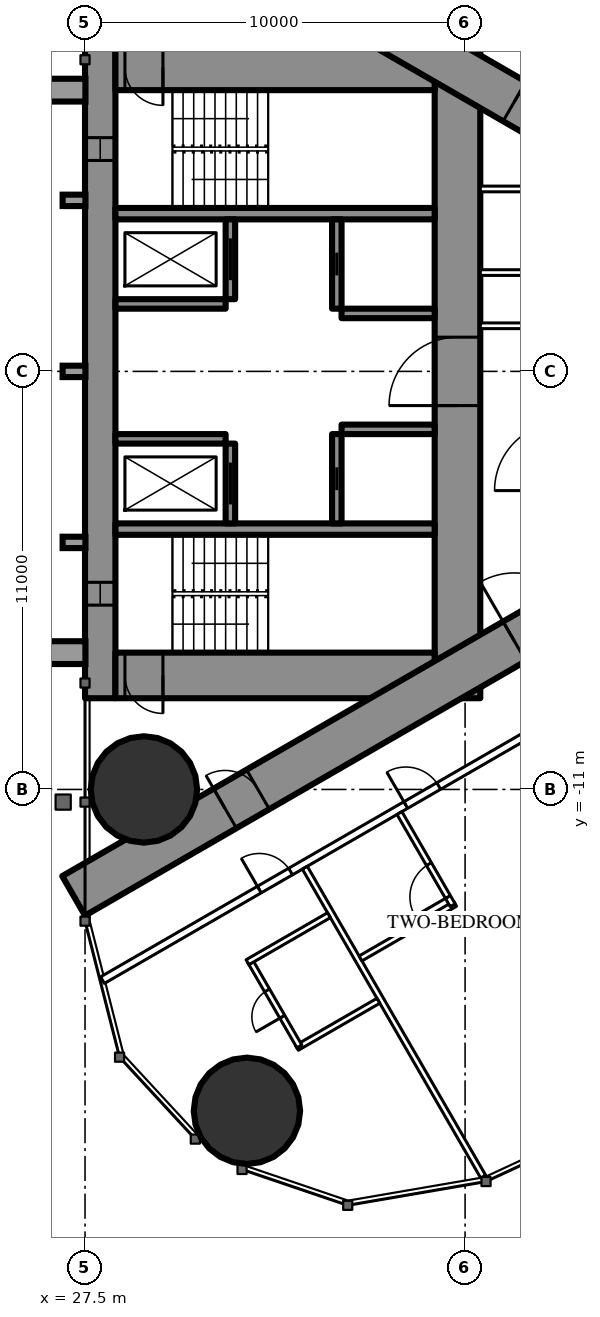
"""IFC4 building model, lengths in metres.
Left out: names, types, materials, properties, quantities, classifications, styles, units other than length and angle.
Written with IfcOpenShell. Run it as: python <this file> out.ifc"""

import sys

from ifc_helpers import new_model, si_unit, direction, frame, frame_2d, origin, origin_2d, place, context, subcontext, project, spatial, rectangle, circle, extrude, element, fill, save


model = new_model("IFC4")
c1 = context("Model", 3, precision=1e-05, world=origin(), true_north=direction((0.0, 1.0)))
c2 = subcontext(c1, "Body", "Model", "MODEL_VIEW")
j1 = project(units=[si_unit("LENGTHUNIT", "METRE"), si_unit("PLANEANGLEUNIT", "RADIAN")], contexts=[c1])
p1 = place(None, origin())
s1 = spatial("IfcSite", under=j1, at=p1, CompositionType="ELEMENT")
p2 = place(p1, origin())
s2 = spatial("IfcBuilding", under=s1, at=p2, CompositionType="ELEMENT")
p3 = place(p2, frame((0.0, 0.0, 173.8)))
s3 = spatial("IfcBuildingStorey", under=s2, at=p3, CompositionType="ELEMENT", Elevation=173.8)
for number, where, z_axis, x_axis in (
    (1, (31.76, -19.456, 0.0), (0.0, 0.0, 1.0), (1.0, 0.0, 0.0)),
    (2, (29.05, -11.0, 0.0), (0.0, 0.0, 1.0), (1.0, 0.0, 0.0)),
):
    element("IfcColumn", number, at=place(p3, frame(where, z_axis=z_axis, x_axis=x_axis)), inside=s3, PredefinedType="COLUMN", context=c2, shape_type="SweptSolid", body=[
        extrude(circle(Radius=1.4, at=origin_2d()), origin(), (0.0, 0.0, 1.0), 3.5),
    ])
p4 = place(p3, frame((27.9, -8.6, 0.0), z_axis=(0.0, 0.0, 1.0), x_axis=(0.0, 1.0, 0.0)))
e3 = element("IfcWall", 3, at=p4, inside=s3, PredefinedType="SHEAR", context=c2, shape_type="SweptSolid", body=[
    extrude(rectangle(XDim=17.2, YDim=0.8, at=frame_2d((8.6, 0.0))), origin(), (0.0, 0.0, 1.0), 3.5),
])
p5 = place(p4, frame((2.45, 0.0, 0.6)))
e4 = element("IfcOpeningElement", 4, at=p5, cuts=e3, PredefinedType="OPENING", context=c2, shape_type="SweptSolid", body=[
    extrude(rectangle(XDim=0.6, YDim=2.1, at=frame_2d((0.3, 1.05))), frame((0.0, 0.41, 0.0), z_axis=(0.0, -1.0, 0.0), x_axis=(1.0, 0.0, 0.0)), (0.0, 0.0, 1.0), 0.82),
])
p6 = place(p4, frame((14.15, 0.0, 0.6)))
e5 = element("IfcOpeningElement", 5, at=p6, cuts=e3, PredefinedType="OPENING", context=c2, shape_type="SweptSolid", body=[
    extrude(rectangle(XDim=0.6, YDim=2.1, at=frame_2d((0.3, 1.05))), frame((0.0, 0.41, 0.0), z_axis=(0.0, -1.0, 0.0), x_axis=(1.0, 0.0, 0.0)), (0.0, 0.0, 1.0), 0.82),
])
p7 = place(p3, frame((37.3, -8.6, 0.0), z_axis=(0.0, 0.0, 1.0), x_axis=(0.0, 1.0, 0.0)))
e6 = element("IfcWall", 6, at=p7, inside=s3, PredefinedType="SHEAR", context=c2, shape_type="SweptSolid", body=[
    extrude(rectangle(XDim=17.2, YDim=1.2, at=frame_2d((8.6, 0.0))), origin(), (0.0, 0.0, 1.0), 3.5),
])
p8 = place(p7, frame((7.7, 0.0, 0.0)))
e7 = element("IfcOpeningElement", 7, at=p8, cuts=e6, PredefinedType="OPENING", context=c2, shape_type="SweptSolid", body=[
    extrude(rectangle(XDim=1.8, YDim=2.2, at=frame_2d((0.9, 1.1))), frame((0.0, 0.61, 0.0), z_axis=(0.0, -1.0, 0.0), x_axis=(1.0, 0.0, 0.0)), (0.0, 0.0, 1.0), 1.22),
])
p9 = place(p3, frame((28.3, -8.0, 0.0), z_axis=(0.0, 0.0, 1.0), x_axis=(1.0, 0.0, 0.0)))
e8 = element("IfcWall", 8, at=p9, inside=s3, PredefinedType="SHEAR", context=c2, shape_type="SweptSolid", body=[
    extrude(rectangle(XDim=8.4, YDim=1.2, at=frame_2d((4.2, 0.0))), origin(), (0.0, 0.0, 1.0), 3.5),
])
p10 = place(p9, frame((0.25, 0.0, 0.0)))
e9 = element("IfcOpeningElement", 9, at=p10, cuts=e8, PredefinedType="OPENING", context=c2, shape_type="SweptSolid", body=[
    extrude(rectangle(XDim=1.0, YDim=2.2, at=frame_2d((0.5, 1.1))), frame((0.0, 0.61, 0.0), z_axis=(0.0, -1.0, 0.0), x_axis=(1.0, 0.0, 0.0)), (0.0, 0.0, 1.0), 1.22),
])
p11 = place(p3, frame((28.3, 8.0, 0.0), z_axis=(0.0, 0.0, 1.0), x_axis=(1.0, 0.0, 0.0)))
e10 = element("IfcWall", 10, at=p11, inside=s3, PredefinedType="SHEAR", context=c2, shape_type="SweptSolid", body=[
    extrude(rectangle(XDim=8.4, YDim=1.2, at=frame_2d((4.2, 0.0))), origin(), (0.0, 0.0, 1.0), 3.5),
])
p12 = place(p11, frame((0.25, 0.0, 0.0)))
e11 = element("IfcOpeningElement", 11, at=p12, cuts=e10, PredefinedType="OPENING", context=c2, shape_type="SweptSolid", body=[
    extrude(rectangle(XDim=1.0, YDim=2.2, at=frame_2d((0.5, 1.1))), frame((0.0, 0.61, 0.0), z_axis=(0.0, -1.0, 0.0), x_axis=(1.0, 0.0, 0.0)), (0.0, 0.0, 1.0), 1.22),
])
for number, where, z_axis, x_axis in (
    (12, (28.3, -4.15, 0.0), (0.0, 0.0, 1.0), (1.0, 0.0, 0.0)),
    (13, (28.3, 4.15, 0.0), (0.0, 0.0, 1.0), (1.0, 0.0, 0.0)),
):
    element("IfcWall", number, at=place(p3, frame(where, z_axis=z_axis, x_axis=x_axis)), inside=s3, PredefinedType="SHEAR", context=c2, shape_type="SweptSolid", body=[
        extrude(rectangle(XDim=8.4, YDim=0.3, at=frame_2d((4.2, 0.0))), origin(), (0.0, 0.0, 1.0), 3.5),
    ])
p13 = place(p3, frame((31.325, -4.0, 0.0), z_axis=(0.0, 0.0, 1.0), x_axis=(0.0, 1.0, 0.0)))
e14 = element("IfcWall", 14, at=p13, inside=s3, PredefinedType="SHEAR", context=c2, shape_type="SweptSolid", body=[
    extrude(rectangle(XDim=2.1, YDim=0.25, at=frame_2d((1.05, 0.0))), origin(), (0.0, 0.0, 1.0), 3.5),
])
p14 = place(p13, frame((0.5, 0.0, 0.0)))
e15 = element("IfcOpeningElement", 15, at=p14, cuts=e14, PredefinedType="OPENING", context=c2, shape_type="SweptSolid", body=[
    extrude(rectangle(XDim=1.1, YDim=2.2, at=frame_2d((0.55, 1.1))), frame((0.0, 0.135, 0.0), z_axis=(0.0, -1.0, 0.0), x_axis=(1.0, 0.0, 0.0)), (0.0, 0.0, 1.0), 0.27),
])
p15 = place(p3, frame((34.125, -4.0, 0.0), z_axis=(0.0, 0.0, 1.0), x_axis=(0.0, 1.0, 0.0)))
e16 = element("IfcWall", 16, at=p15, inside=s3, PredefinedType="SHEAR", context=c2, shape_type="SweptSolid", body=[
    extrude(rectangle(XDim=2.35, YDim=0.25, at=frame_2d((1.175, 0.0))), origin(), (0.0, 0.0, 1.0), 3.5),
])
p16 = place(p15, frame((0.875, 0.0, 0.0)))
e17 = element("IfcOpeningElement", 17, at=p16, cuts=e16, PredefinedType="OPENING", context=c2, shape_type="SweptSolid", body=[
    extrude(rectangle(XDim=0.6, YDim=2.0, at=frame_2d((0.3, 1.0))), frame((0.0, 0.135, 0.0), z_axis=(0.0, -1.0, 0.0), x_axis=(1.0, 0.0, 0.0)), (0.0, 0.0, 1.0), 0.27),
])
p17 = place(p3, frame((28.3, -1.775, 0.0), z_axis=(0.0, 0.0, 1.0), x_axis=(1.0, 0.0, 0.0)))
e18 = element("IfcWall", 18, at=p17, inside=s3, PredefinedType="SHEAR", context=c2, shape_type="SweptSolid", body=[
    extrude(rectangle(XDim=2.9, YDim=0.25, at=frame_2d((1.45, 0.0))), origin(), (0.0, 0.0, 1.0), 3.5),
])
p18 = place(p3, frame((34.25, -1.525, 0.0), z_axis=(0.0, 0.0, 1.0), x_axis=(1.0, 0.0, 0.0)))
e19 = element("IfcWall", 19, at=p18, inside=s3, PredefinedType="SHEAR", context=c2, shape_type="SweptSolid", body=[
    extrude(rectangle(XDim=2.45, YDim=0.25, at=frame_2d((1.225, 0.0))), origin(), (0.0, 0.0, 1.0), 3.5),
])
p19 = place(p3, frame((31.325, 1.9, 0.0), z_axis=(0.0, 0.0, 1.0), x_axis=(0.0, 1.0, 0.0)))
e20 = element("IfcWall", 20, at=p19, inside=s3, PredefinedType="SHEAR", context=c2, shape_type="SweptSolid", body=[
    extrude(rectangle(XDim=2.1, YDim=0.25, at=frame_2d((1.05, 0.0))), origin(), (0.0, 0.0, 1.0), 3.5),
])
p20 = place(p19, frame((0.5, 0.0, 0.0)))
e21 = element("IfcOpeningElement", 21, at=p20, cuts=e20, PredefinedType="OPENING", context=c2, shape_type="SweptSolid", body=[
    extrude(rectangle(XDim=1.1, YDim=2.2, at=frame_2d((0.55, 1.1))), frame((0.0, 0.135, 0.0), z_axis=(0.0, -1.0, 0.0), x_axis=(1.0, 0.0, 0.0)), (0.0, 0.0, 1.0), 0.27),
])
p21 = place(p3, frame((34.125, 1.65, 0.0), z_axis=(0.0, 0.0, 1.0), x_axis=(0.0, 1.0, 0.0)))
e22 = element("IfcWall", 22, at=p21, inside=s3, PredefinedType="SHEAR", context=c2, shape_type="SweptSolid", body=[
    extrude(rectangle(XDim=2.35, YDim=0.25, at=frame_2d((1.175, 0.0))), origin(), (0.0, 0.0, 1.0), 3.5),
])
p22 = place(p21, frame((0.875, 0.0, 0.0)))
e23 = element("IfcOpeningElement", 23, at=p22, cuts=e22, PredefinedType="OPENING", context=c2, shape_type="SweptSolid", body=[
    extrude(rectangle(XDim=0.6, YDim=2.0, at=frame_2d((0.3, 1.0))), frame((0.0, 0.135, 0.0), z_axis=(0.0, -1.0, 0.0), x_axis=(1.0, 0.0, 0.0)), (0.0, 0.0, 1.0), 0.27),
])
p23 = place(p3, frame((28.3, 1.775, 0.0), z_axis=(0.0, 0.0, 1.0), x_axis=(1.0, 0.0, 0.0)))
e24 = element("IfcWall", 24, at=p23, inside=s3, PredefinedType="SHEAR", context=c2, shape_type="SweptSolid", body=[
    extrude(rectangle(XDim=2.9, YDim=0.25, at=frame_2d((1.45, 0.0))), origin(), (0.0, 0.0, 1.0), 3.5),
])
p24 = place(p3, frame((34.25, 1.525, 0.0), z_axis=(0.0, 0.0, 1.0), x_axis=(1.0, 0.0, 0.0)))
e25 = element("IfcWall", 25, at=p24, inside=s3, PredefinedType="SHEAR", context=c2, shape_type="SweptSolid", body=[
    extrude(rectangle(XDim=2.45, YDim=0.25, at=frame_2d((1.225, 0.0))), origin(), (0.0, 0.0, 1.0), 3.5),
])
p25 = place(p3, frame((27.2, -13.8, 0.0), z_axis=(0.0, 0.0, 1.0), x_axis=(0.866027159892, 0.499996958321, 0.0)))
e26 = element("IfcWall", 26, at=p25, inside=s3, PredefinedType="SHEAR", context=c2, shape_type="SweptSolid", body=[
    extrude(rectangle(XDim=27.947, YDim=1.2, at=frame_2d((13.973, 0.0))), origin(), (0.0, 0.0, 1.0), 3.5),
])
p26 = place(p25, frame((4.6, 0.0, 0.0)))
e27 = element("IfcOpeningElement", 27, at=p26, cuts=e26, PredefinedType="OPENING", context=c2, shape_type="SweptSolid", body=[
    extrude(rectangle(XDim=1.0, YDim=2.2, at=frame_2d((0.5, 1.1))), frame((0.0, 0.61, 0.0), z_axis=(0.0, -1.0, 0.0), x_axis=(1.0, 0.0, 0.0)), (0.0, 0.0, 1.0), 1.22),
])
p27 = place(p25, frame((13.395, 0.0, 0.0)))
e28 = element("IfcOpeningElement", 28, at=p27, cuts=e26, PredefinedType="OPENING", context=c2, shape_type="SweptSolid", body=[
    extrude(rectangle(XDim=1.8, YDim=2.2, at=frame_2d((0.9, 1.1))), frame((0.0, 0.61, 0.0), z_axis=(0.0, -1.0, 0.0), x_axis=(1.0, 0.0, 0.0)), (0.0, 0.0, 1.0), 1.22),
])
p28 = place(p3, frame((27.2, 13.8, 0.0), z_axis=(0.0, 0.0, 1.0), x_axis=(0.866024515034, -0.500001539357, 0.0)))
e29 = element("IfcWall", 29, at=p28, inside=s3, PredefinedType="SHEAR", context=c2, shape_type="SweptSolid", body=[
    extrude(rectangle(XDim=26.907, YDim=1.2, at=frame_2d((13.454, 0.0))), origin(), (0.0, 0.0, 1.0), 3.5),
])
p29 = place(p28, frame((4.6, 0.0, 0.0)))
e30 = element("IfcOpeningElement", 30, at=p29, cuts=e29, PredefinedType="OPENING", context=c2, shape_type="SweptSolid", body=[
    extrude(rectangle(XDim=1.0, YDim=2.2, at=frame_2d((0.5, 1.1))), frame((0.0, 0.61, 0.0), z_axis=(0.0, -1.0, 0.0), x_axis=(1.0, 0.0, 0.0)), (0.0, 0.0, 1.0), 1.22),
])
p30 = place(p28, frame((13.395, 0.0, 0.0)))
e31 = element("IfcOpeningElement", 31, at=p30, cuts=e29, PredefinedType="OPENING", context=c2, shape_type="SweptSolid", body=[
    extrude(rectangle(XDim=1.8, YDim=2.2, at=frame_2d((0.9, 1.1))), frame((0.0, 0.61, 0.0), z_axis=(0.0, -1.0, 0.0), x_axis=(1.0, 0.0, 0.0)), (0.0, 0.0, 1.0), 1.22),
])
p31 = place(p3, frame((27.959, -16.017, 0.0), z_axis=(0.0, 0.0, 1.0), x_axis=(0.866024151371, 0.500002169237, 0.0)))
e32 = element("IfcWall", 32, at=p31, inside=s3, PredefinedType="PARTITIONING", context=c2, shape_type="SweptSolid", body=[
    extrude(rectangle(XDim=32.034, YDim=0.2, at=frame_2d((16.017, 0.0))), origin(), (0.0, 0.0, 1.0), 3.25),
])
p32 = place(p31, frame((4.765, 0.0, 0.0)))
e33 = element("IfcOpeningElement", 33, at=p32, cuts=e32, PredefinedType="OPENING", context=c2, shape_type="SweptSolid", body=[
    extrude(rectangle(XDim=0.95, YDim=2.2, at=frame_2d((0.475, 1.1))), frame((0.0, 0.11, 0.0), z_axis=(0.0, -1.0, 0.0), x_axis=(1.0, 0.0, 0.0)), (0.0, 0.0, 1.0), 0.22),
])
p33 = place(p31, frame((9.215, 0.0, 0.0)))
e34 = element("IfcOpeningElement", 34, at=p33, cuts=e32, PredefinedType="OPENING", context=c2, shape_type="SweptSolid", body=[
    extrude(rectangle(XDim=1.0, YDim=2.2, at=frame_2d((0.5, 1.1))), frame((0.0, 0.11, 0.0), z_axis=(0.0, -1.0, 0.0), x_axis=(1.0, 0.0, 0.0)), (0.0, 0.0, 1.0), 0.22),
])
p34 = place(p31, frame((19.725, 0.0, 0.0)))
e35 = element("IfcOpeningElement", 35, at=p34, cuts=e32, PredefinedType="OPENING", context=c2, shape_type="SweptSolid", body=[
    extrude(rectangle(XDim=0.95, YDim=2.2, at=frame_2d((0.475, 1.1))), frame((0.0, 0.11, 0.0), z_axis=(0.0, -1.0, 0.0), x_axis=(1.0, 0.0, 0.0)), (0.0, 0.0, 1.0), 0.22),
])
p35 = place(p31, frame((26.125, 0.0, 0.0)))
e36 = element("IfcOpeningElement", 36, at=p35, cuts=e32, PredefinedType="OPENING", context=c2, shape_type="SweptSolid", body=[
    extrude(rectangle(XDim=0.95, YDim=2.2, at=frame_2d((0.475, 1.1))), frame((0.0, 0.11, 0.0), z_axis=(0.0, -1.0, 0.0), x_axis=(1.0, 0.0, 0.0)), (0.0, 0.0, 1.0), 0.22),
])
p36 = place(p31, frame((28.106, 0.0, 0.0)))
e37 = element("IfcOpeningElement", 37, at=p36, cuts=e32, PredefinedType="OPENING", context=c2, shape_type="SweptSolid", body=[
    extrude(rectangle(XDim=0.95, YDim=2.2, at=frame_2d((0.475, 1.1))), frame((0.0, 0.11, 0.0), z_axis=(0.0, -1.0, 0.0), x_axis=(1.0, 0.0, 0.0)), (0.0, 0.0, 1.0), 0.22),
])
p37 = place(p3, frame((33.284, -13.059, 0.0), z_axis=(0.0, 0.0, 1.0), x_axis=(0.499985904184, -0.866033541855, 0.0)))
e38 = element("IfcWall", 38, at=p37, inside=s3, PredefinedType="PARTITIONING", context=c2, shape_type="SweptSolid", body=[
    extrude(rectangle(XDim=9.385, YDim=0.15, at=frame_2d((4.693, 0.0))), origin(), (0.0, 0.0, 1.0), 3.25),
])
p38 = place(p3, frame((33.075, -17.798, 0.0), z_axis=(0.0, 0.0, 1.0), x_axis=(0.866006523861, 0.500032699561, 0.0)))
e39 = element("IfcWall", 39, at=p38, inside=s3, PredefinedType="PARTITIONING", context=c2, shape_type="SweptSolid", body=[
    extrude(rectangle(XDim=2.475, YDim=0.15, at=frame_2d((1.237, 0.0))), origin(), (0.0, 0.0, 1.0), 3.25),
])
p39 = place(p3, frame((31.84, -15.509, 0.0), z_axis=(0.0, 0.0, 1.0), x_axis=(0.500006934395, -0.866021400173, 0.0)))
e40 = element("IfcWall", 40, at=p39, inside=s3, PredefinedType="PARTITIONING", context=c2, shape_type="SweptSolid", body=[
    extrude(rectangle(XDim=2.6, YDim=0.15, at=frame_2d((1.3, 0.0))), origin(), (0.0, 0.0, 1.0), 3.25),
])
p40 = place(p39, frame((0.9, 0.0, 0.0)))
e41 = element("IfcOpeningElement", 41, at=p40, cuts=e40, PredefinedType="OPENING", context=c2, shape_type="SweptSolid", body=[
    extrude(rectangle(XDim=0.8, YDim=2.2, at=frame_2d((0.4, 1.1))), frame((0.0, 0.085, 0.0), z_axis=(0.0, -1.0, 0.0), x_axis=(1.0, 0.0, 0.0)), (0.0, 0.0, 1.0), 0.17),
])
p41 = place(p3, frame((31.775, -15.546, 0.0), z_axis=(0.0, 0.0, 1.0), x_axis=(0.866031185235, 0.4999899861, 0.0)))
e42 = element("IfcWall", 42, at=p41, inside=s3, PredefinedType="PARTITIONING", context=c2, shape_type="SweptSolid", body=[
    extrude(rectangle(XDim=2.475, YDim=0.15, at=frame_2d((1.238, 0.0))), origin(), (0.0, 0.0, 1.0), 3.25),
])
p42 = place(p3, frame((34.749, -15.446, 0.0), z_axis=(0.0, 0.0, 1.0), x_axis=(0.866018712932, 0.500011588718, 0.0)))
e43 = element("IfcWall", 43, at=p42, inside=s3, PredefinedType="PARTITIONING", context=c2, shape_type="SweptSolid", body=[
    extrude(rectangle(XDim=2.875, YDim=0.15, at=frame_2d((1.438, 0.0))), origin(), (0.0, 0.0, 1.0), 3.25),
])
p43 = place(p3, frame((35.773, -11.621, 0.0), z_axis=(0.0, 0.0, 1.0), x_axis=(0.49998411664, -0.866034573852, 0.0)))
e44 = element("IfcWall", 44, at=p43, inside=s3, PredefinedType="PARTITIONING", context=c2, shape_type="SweptSolid", body=[
    extrude(rectangle(XDim=2.8, YDim=0.15, at=frame_2d((1.4, 0.0))), origin(), (0.0, 0.0, 1.0), 3.25),
])
p44 = place(p43, frame((1.55, 0.0, 0.0)))
e45 = element("IfcOpeningElement", 45, at=p44, cuts=e44, PredefinedType="OPENING", context=c2, shape_type="SweptSolid", body=[
    extrude(rectangle(XDim=1.0, YDim=2.2, at=frame_2d((0.5, 1.1))), frame((0.0, 0.085, 0.0), z_axis=(0.0, -1.0, 0.0), x_axis=(1.0, 0.0, 0.0)), (0.0, 0.0, 1.0), 0.17),
])
for number, where, z_axis, x_axis in (
    (46, (37.9, 1.2, 0.0), (0.0, 0.0, 1.0), (1.0, 0.0, 0.0)),
    (47, (37.9, 2.6, 0.0), (0.0, 0.0, 1.0), (1.0, 0.0, 0.0)),
    (48, (37.9, 4.8, 0.0), (0.0, 0.0, 1.0), (1.0, 0.0, 0.0)),
):
    element("IfcWall", number, at=place(p3, frame(where, z_axis=z_axis, x_axis=x_axis)), inside=s3, PredefinedType="PARTITIONING", context=c2, shape_type="SweptSolid", body=[
        extrude(rectangle(XDim=2.175, YDim=0.15, at=frame_2d((1.087, 0.0))), origin(), (0.0, 0.0, 1.0), 3.25),
    ])
p45 = place(p40, origin())
e49 = element("IfcDoor", 49, at=p45, inside=s3, OperationType="SINGLE_SWING_RIGHT", PredefinedType="DOOR", context=c2, shape_type="SweptSolid", body=[
    extrude(rectangle(XDim=0.8, YDim=2.2, at=frame_2d((0.4, 1.1))), frame((0.0, 0.025, 0.0), z_axis=(0.0, -1.0, 0.0), x_axis=(1.0, 0.0, 0.0)), (0.0, 0.0, 1.0), 0.05),
])
fill(e41, e49)
p46 = place(p32, origin())
e50 = element("IfcDoor", 50, at=p46, inside=s3, OperationType="SINGLE_SWING_LEFT", PredefinedType="DOOR", context=c2, shape_type="SweptSolid", body=[
    extrude(rectangle(XDim=0.95, YDim=2.2, at=frame_2d((0.475, 1.1))), frame((0.0, 0.025, 0.0), z_axis=(0.0, -1.0, 0.0), x_axis=(1.0, 0.0, 0.0)), (0.0, 0.0, 1.0), 0.05),
])
fill(e33, e50)
p47 = place(p44, origin())
e51 = element("IfcDoor", 51, at=p47, inside=s3, OperationType="SINGLE_SWING_RIGHT", PredefinedType="DOOR", context=c2, shape_type="SweptSolid", body=[
    extrude(rectangle(XDim=1.0, YDim=2.2, at=frame_2d((0.5, 1.1))), frame((0.0, 0.025, 0.0), z_axis=(0.0, -1.0, 0.0), x_axis=(1.0, 0.0, 0.0)), (0.0, 0.0, 1.0), 0.05),
])
fill(e45, e51)
p48 = place(p33, origin())
e52 = element("IfcDoor", 52, at=p48, inside=s3, OperationType="SINGLE_SWING_LEFT", PredefinedType="DOOR", context=c2, shape_type="SweptSolid", body=[
    extrude(rectangle(XDim=1.0, YDim=2.2, at=frame_2d((0.5, 1.1))), frame((0.0, 0.025, 0.0), z_axis=(0.0, -1.0, 0.0), x_axis=(1.0, 0.0, 0.0)), (0.0, 0.0, 1.0), 0.05),
])
fill(e34, e52)
p49 = place(p26, origin())
e53 = element("IfcDoor", 53, at=p49, inside=s3, OperationType="SINGLE_SWING_LEFT", PredefinedType="DOOR", context=c2, shape_type="SweptSolid", body=[
    extrude(rectangle(XDim=1.0, YDim=2.2, at=frame_2d((0.5, 1.1))), frame((0.0, 0.025, 0.0), z_axis=(0.0, -1.0, 0.0), x_axis=(1.0, 0.0, 0.0)), (0.0, 0.0, 1.0), 0.05),
])
fill(e27, e53)
p50 = place(p27, origin())
e54 = element("IfcDoor", 54, at=p50, inside=s3, OperationType="DOUBLE_DOOR_SINGLE_SWING", PredefinedType="DOOR", context=c2, shape_type="SweptSolid", body=[
    extrude(rectangle(XDim=1.8, YDim=2.2, at=frame_2d((0.9, 1.1))), frame((0.0, 0.025, 0.0), z_axis=(0.0, -1.0, 0.0), x_axis=(1.0, 0.0, 0.0)), (0.0, 0.0, 1.0), 0.05),
])
fill(e28, e54)
p51 = place(p30, origin())
e55 = element("IfcDoor", 55, at=p51, inside=s3, OperationType="DOUBLE_DOOR_SINGLE_SWING", PredefinedType="DOOR", context=c2, shape_type="SweptSolid", body=[
    extrude(rectangle(XDim=1.8, YDim=2.2, at=frame_2d((0.9, 1.1))), frame((0.0, 0.025, 0.0), z_axis=(0.0, -1.0, 0.0), x_axis=(1.0, 0.0, 0.0)), (0.0, 0.0, 1.0), 0.05),
])
fill(e31, e55)
p52 = place(p8, origin())
e56 = element("IfcDoor", 56, at=p52, inside=s3, OperationType="DOUBLE_DOOR_SINGLE_SWING", PredefinedType="DOOR", context=c2, shape_type="SweptSolid", body=[
    extrude(rectangle(XDim=1.8, YDim=2.2, at=frame_2d((0.9, 1.1))), frame((0.0, 0.025, 0.0), z_axis=(0.0, -1.0, 0.0), x_axis=(1.0, 0.0, 0.0)), (0.0, 0.0, 1.0), 0.05),
])
fill(e7, e56)
p53 = place(p10, origin())
e57 = element("IfcDoor", 57, at=p53, inside=s3, OperationType="SINGLE_SWING_RIGHT", PredefinedType="DOOR", context=c2, shape_type="SweptSolid", body=[
    extrude(rectangle(XDim=1.0, YDim=2.2, at=frame_2d((0.5, 1.1))), frame((0.0, 0.025, 0.0), z_axis=(0.0, -1.0, 0.0), x_axis=(1.0, 0.0, 0.0)), (0.0, 0.0, 1.0), 0.05),
])
fill(e9, e57)
p54 = place(p12, origin())
e58 = element("IfcDoor", 58, at=p54, inside=s3, OperationType="SINGLE_SWING_RIGHT", PredefinedType="DOOR", context=c2, shape_type="SweptSolid", body=[
    extrude(rectangle(XDim=1.0, YDim=2.2, at=frame_2d((0.5, 1.1))), frame((0.0, 0.025, 0.0), z_axis=(0.0, -1.0, 0.0), x_axis=(1.0, 0.0, 0.0)), (0.0, 0.0, 1.0), 0.05),
])
fill(e11, e58)
p55 = place(p14, origin())
e59 = element("IfcDoor", 59, at=p55, inside=s3, OperationType="SLIDING_TO_LEFT", PredefinedType="USERDEFINED", context=c2, shape_type="SweptSolid", body=[
    extrude(rectangle(XDim=1.1, YDim=2.2, at=frame_2d((0.55, 1.1))), frame((0.0, 0.025, 0.0), z_axis=(0.0, -1.0, 0.0), x_axis=(1.0, 0.0, 0.0)), (0.0, 0.0, 1.0), 0.05),
])
fill(e15, e59)
p56 = place(p20, origin())
e60 = element("IfcDoor", 60, at=p56, inside=s3, OperationType="SLIDING_TO_LEFT", PredefinedType="USERDEFINED", context=c2, shape_type="SweptSolid", body=[
    extrude(rectangle(XDim=1.1, YDim=2.2, at=frame_2d((0.55, 1.1))), frame((0.0, 0.025, 0.0), z_axis=(0.0, -1.0, 0.0), x_axis=(1.0, 0.0, 0.0)), (0.0, 0.0, 1.0), 0.05),
])
fill(e21, e60)
p57 = place(p16, origin())
e61 = element("IfcDoor", 61, at=p57, inside=s3, OperationType="SLIDING_TO_LEFT", PredefinedType="DOOR", context=c2, shape_type="SweptSolid", body=[
    extrude(rectangle(XDim=0.6, YDim=2.0, at=frame_2d((0.3, 1.0))), frame((0.0, 0.025, 0.0), z_axis=(0.0, -1.0, 0.0), x_axis=(1.0, 0.0, 0.0)), (0.0, 0.0, 1.0), 0.05),
])
fill(e17, e61)
p58 = place(p22, origin())
e62 = element("IfcDoor", 62, at=p58, inside=s3, OperationType="SLIDING_TO_LEFT", PredefinedType="DOOR", context=c2, shape_type="SweptSolid", body=[
    extrude(rectangle(XDim=0.6, YDim=2.0, at=frame_2d((0.3, 1.0))), frame((0.0, 0.025, 0.0), z_axis=(0.0, -1.0, 0.0), x_axis=(1.0, 0.0, 0.0)), (0.0, 0.0, 1.0), 0.05),
])
fill(e23, e62)
p59 = place(p5, origin())
e63 = element("IfcWindow", 63, at=p59, inside=s3, PartitioningType="SINGLE_PANEL", PredefinedType="WINDOW", context=c2, shape_type="SweptSolid", body=[
    extrude(rectangle(XDim=0.6, YDim=2.1, at=frame_2d((0.3, 1.05))), frame((0.0, 0.03, 0.0), z_axis=(0.0, -1.0, 0.0), x_axis=(1.0, 0.0, 0.0)), (0.0, 0.0, 1.0), 0.06),
])
fill(e4, e63)
p60 = place(p6, origin())
e64 = element("IfcWindow", 64, at=p60, inside=s3, PartitioningType="SINGLE_PANEL", PredefinedType="WINDOW", context=c2, shape_type="SweptSolid", body=[
    extrude(rectangle(XDim=0.6, YDim=2.1, at=frame_2d((0.3, 1.05))), frame((0.0, 0.03, 0.0), z_axis=(0.0, -1.0, 0.0), x_axis=(1.0, 0.0, 0.0)), (0.0, 0.0, 1.0), 0.06),
])
fill(e5, e64)
save(model, sys.argv[1])
